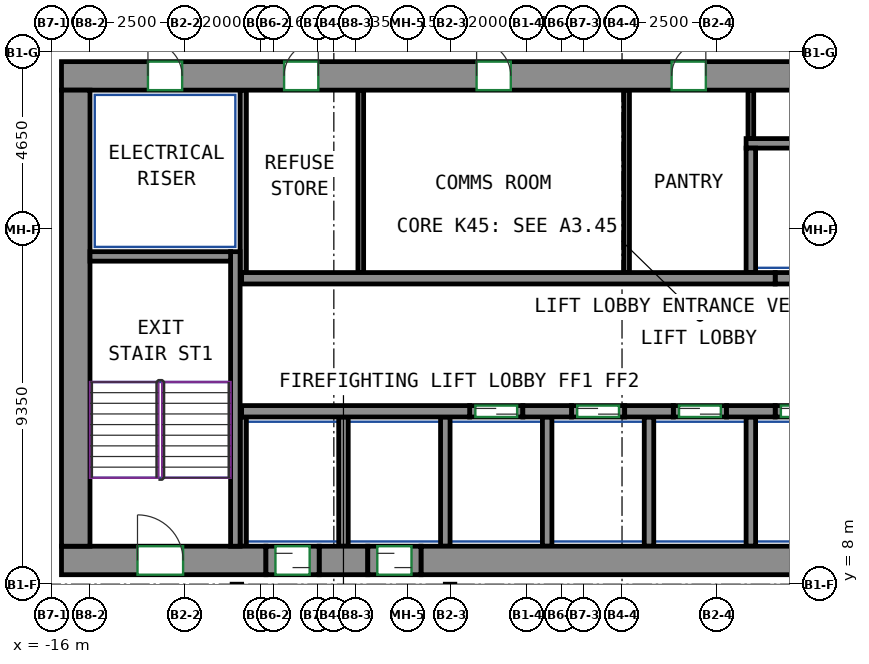
"""IFC4 building model, lengths in metres.
Left out: names, types, materials, properties, quantities, classifications, styles, units other than length and angle.
Written with IfcOpenShell. Run it as: python <this file> out.ifc"""

import sys

from ifc_helpers import new_model, si_unit, direction, frame, frame_2d, origin, place, context, subcontext, project, spatial, rectangle, extrude, source, transform, mapped, element, fill, save


model = new_model("IFC4")
c1 = context("Model", 3, precision=1e-05, world=origin(), true_north=direction((0.0, 1.0)))
c2 = subcontext(c1, "Body", "Model", "MODEL_VIEW")
j1 = project(units=[si_unit("LENGTHUNIT", "METRE"), si_unit("PLANEANGLEUNIT", "RADIAN")], contexts=[c1])
p1 = place(None, origin())
s1 = spatial("IfcSite", under=j1, at=p1, CompositionType="ELEMENT")
p2 = place(p1, origin())
s2 = spatial("IfcBuilding", under=s1, at=p2, CompositionType="ELEMENT")
p3 = place(p2, frame((0.0, 0.0, 185.5)))
s3 = spatial("IfcBuildingStorey", under=s2, at=p3, CompositionType="ELEMENT", Elevation=185.5)
m1 = source(origin(), c2, "Body", "SweptSolid", [
    extrude(rectangle(XDim=5.38, YDim=0.75, at=frame_2d((2.69, 0.0))), origin(), (0.0, 0.0, 1.0), 3.12),
])
p4 = place(p3, frame((-15.75, 8.625, 0.0), z_axis=(0.0, 0.0, 1.0), x_axis=(1.0, 0.0, 0.0)))
e1 = element("IfcWall", 1, at=p4, inside=s3, PredefinedType="SHEAR", context=c2, shape_type="MappedRepresentation", body=[
    mapped(m1, transform((0.0, 0.0, 0.0))),
])
p5 = place(p4, frame((2.0, 0.0, 0.0)))
e2 = element("IfcOpeningElement", 2, at=p5, cuts=e1, PredefinedType="OPENING", context=c2, shape_type="SweptSolid", body=[
    extrude(rectangle(XDim=1.2, YDim=2.1, at=frame_2d((0.6, 1.05))), frame((0.0, 0.385, 0.0), z_axis=(0.0, -1.0, 0.0), x_axis=(1.0, 0.0, 0.0)), (0.0, 0.0, 1.0), 0.77),
])
m2 = source(origin(), c2, "Body", "SweptSolid", [
    extrude(rectangle(XDim=1.28, YDim=0.75, at=frame_2d((0.64, 0.0))), origin(), (0.0, 0.0, 1.0), 3.12),
])
p6 = place(p3, frame((-8.97, 8.625, 0.0), z_axis=(0.0, 0.0, 1.0), x_axis=(1.0, 0.0, 0.0)))
e3 = element("IfcWall", 3, at=p6, inside=s3, PredefinedType="SHEAR", context=c2, shape_type="MappedRepresentation", body=[
    mapped(m2, transform((0.0, 0.0, 0.0))),
])
m3 = source(origin(), c2, "Body", "SweptSolid", [
    extrude(rectangle(XDim=14.18, YDim=0.75, at=frame_2d((7.09, 0.0))), origin(), (0.0, 0.0, 1.0), 3.12),
])
p7 = place(p3, frame((-6.29, 8.625, 0.0), z_axis=(0.0, 0.0, 1.0), x_axis=(1.0, 0.0, 0.0)))
e4 = element("IfcWall", 4, at=p7, inside=s3, PredefinedType="SHEAR", context=c2, shape_type="MappedRepresentation", body=[
    mapped(m3, transform((0.0, 0.0, 0.0))),
])
m4 = source(origin(), c2, "Body", "SweptSolid", [
    extrude(rectangle(XDim=33.6, YDim=0.75, at=frame_2d((16.8, 0.0))), origin(), (0.0, 0.0, 1.0), 3.12),
])
p8 = place(p3, frame((-15.75, 21.375, 0.0), z_axis=(0.0, 0.0, 1.0), x_axis=(1.0, 0.0, 0.0)))
e5 = element("IfcWall", 5, at=p8, inside=s3, PredefinedType="SHEAR", context=c2, shape_type="MappedRepresentation", body=[
    mapped(m4, transform((0.0, 0.0, 0.0))),
])
p9 = place(p8, frame((5.858, 0.0, 0.0)))
e6 = element("IfcOpeningElement", 6, at=p9, cuts=e5, PredefinedType="OPENING", context=c2, shape_type="SweptSolid", body=[
    extrude(rectangle(XDim=0.9, YDim=2.1, at=frame_2d((0.45, 1.05))), frame((0.0, 0.385, 0.0), z_axis=(0.0, -1.0, 0.0), x_axis=(1.0, 0.0, 0.0)), (0.0, 0.0, 1.0), 0.77),
])
p10 = place(p8, frame((10.923, 0.0, 0.0)))
e7 = element("IfcOpeningElement", 7, at=p10, cuts=e5, PredefinedType="OPENING", context=c2, shape_type="SweptSolid", body=[
    extrude(rectangle(XDim=0.9, YDim=2.1, at=frame_2d((0.45, 1.05))), frame((0.0, 0.385, 0.0), z_axis=(0.0, -1.0, 0.0), x_axis=(1.0, 0.0, 0.0)), (0.0, 0.0, 1.0), 0.77),
])
p11 = place(p8, frame((16.055, 0.0, 0.0)))
e8 = element("IfcOpeningElement", 8, at=p11, cuts=e5, PredefinedType="OPENING", context=c2, shape_type="SweptSolid", body=[
    extrude(rectangle(XDim=0.9, YDim=2.1, at=frame_2d((0.45, 1.05))), frame((0.0, 0.385, 0.0), z_axis=(0.0, -1.0, 0.0), x_axis=(1.0, 0.0, 0.0)), (0.0, 0.0, 1.0), 0.77),
])
p12 = place(p8, frame((20.879, 0.0, 0.0)))
e9 = element("IfcOpeningElement", 9, at=p12, cuts=e5, PredefinedType="OPENING", context=c2, shape_type="SweptSolid", body=[
    extrude(rectangle(XDim=0.9, YDim=2.1, at=frame_2d((0.45, 1.05))), frame((0.0, 0.385, 0.0), z_axis=(0.0, -1.0, 0.0), x_axis=(1.0, 0.0, 0.0)), (0.0, 0.0, 1.0), 0.77),
])
p13 = place(p8, frame((26.239, 0.0, 0.0)))
e10 = element("IfcOpeningElement", 10, at=p13, cuts=e5, PredefinedType="OPENING", context=c2, shape_type="SweptSolid", body=[
    extrude(rectangle(XDim=0.9, YDim=2.1, at=frame_2d((0.45, 1.05))), frame((0.0, 0.385, 0.0), z_axis=(0.0, -1.0, 0.0), x_axis=(1.0, 0.0, 0.0)), (0.0, 0.0, 1.0), 0.77),
])
p14 = place(p8, frame((2.275, 0.0, 0.0)))
e11 = element("IfcOpeningElement", 11, at=p14, cuts=e5, PredefinedType="OPENING", context=c2, shape_type="SweptSolid", body=[
    extrude(rectangle(XDim=0.9, YDim=2.1, at=frame_2d((0.45, 1.05))), frame((0.0, 0.385, 0.0), z_axis=(0.0, -1.0, 0.0), x_axis=(1.0, 0.0, 0.0)), (0.0, 0.0, 1.0), 0.77),
])
p15 = place(p8, frame((30.425, 0.0, 0.0)))
e12 = element("IfcOpeningElement", 12, at=p15, cuts=e5, PredefinedType="OPENING", context=c2, shape_type="SweptSolid", body=[
    extrude(rectangle(XDim=0.9, YDim=2.1, at=frame_2d((0.45, 1.05))), frame((0.0, 0.385, 0.0), z_axis=(0.0, -1.0, 0.0), x_axis=(1.0, 0.0, 0.0)), (0.0, 0.0, 1.0), 0.77),
])
m5 = source(origin(), c2, "Body", "SweptSolid", [
    extrude(rectangle(XDim=12.0, YDim=0.75, at=frame_2d((6.0, 0.0))), origin(), (0.0, 0.0, 1.0), 3.12),
])
p16 = place(p3, frame((-15.375, 9.0, 0.0), z_axis=(0.0, 0.0, 1.0), x_axis=(0.0, 1.0, 0.0)))
e13 = element("IfcWall", 13, at=p16, inside=s3, PredefinedType="SHEAR", context=c2, shape_type="MappedRepresentation", body=[
    mapped(m5, transform((0.0, 0.0, 0.0))),
])
m6 = source(origin(), c2, "Body", "SweptSolid", [
    extrude(rectangle(XDim=7.75, YDim=0.25, at=frame_2d((3.875, 0.0))), origin(), (0.0, 0.0, 1.0), 3.12),
])
p17 = place(p3, frame((-11.175, 9.0, 0.0), z_axis=(0.0, 0.0, 1.0), x_axis=(0.0, 1.0, 0.0)))
e14 = element("IfcWall", 14, at=p17, inside=s3, PredefinedType="SHEAR", context=c2, shape_type="MappedRepresentation", body=[
    mapped(m6, transform((0.0, 0.0, 0.0))),
])
m7 = source(origin(), c2, "Body", "SweptSolid", [
    extrude(rectangle(XDim=3.7, YDim=0.25, at=frame_2d((1.85, 0.0))), origin(), (0.0, 0.0, 1.0), 3.12),
])
p18 = place(p3, frame((-15.0, 16.625, 0.0), z_axis=(0.0, 0.0, 1.0), x_axis=(1.0, 0.0, 0.0)))
e15 = element("IfcWall", 15, at=p18, inside=s3, PredefinedType="SHEAR", context=c2, shape_type="MappedRepresentation", body=[
    mapped(m7, transform((0.0, 0.0, 0.0))),
])
m8 = source(origin(), c2, "Body", "SweptSolid", [
    extrude(rectangle(XDim=6.0, YDim=0.3, at=frame_2d((3.0, 0.0))), origin(), (0.0, 0.0, 1.0), 3.12),
])
p19 = place(p3, frame((-11.01, 12.55, 0.0), z_axis=(0.0, 0.0, 1.0), x_axis=(1.0, 0.0, 0.0)))
e16 = element("IfcWall", 16, at=p19, inside=s3, PredefinedType="SHEAR", context=c2, shape_type="MappedRepresentation", body=[
    mapped(m8, transform((0.0, 0.0, 0.0))),
])
m9 = source(origin(), c2, "Body", "SweptSolid", [
    extrude(rectangle(XDim=1.28, YDim=0.3, at=frame_2d((0.64, 0.0))), origin(), (0.0, 0.0, 1.0), 3.12),
])
for number, where, z_axis, x_axis in (
    (17, (-3.61, 12.55, 0.0), (0.0, 0.0, 1.0), (1.0, 0.0, 0.0)),
    (18, (-0.93, 12.55, 0.0), (0.0, 0.0, 1.0), (1.0, 0.0, 0.0)),
    (19, (1.75, 12.55, 0.0), (0.0, 0.0, 1.0), (1.0, 0.0, 0.0)),
):
    element("IfcWall", number, at=place(p3, frame(where, z_axis=z_axis, x_axis=x_axis)), inside=s3, PredefinedType="SHEAR", context=c2, shape_type="MappedRepresentation", body=[
        mapped(m9, transform((0.0, 0.0, 0.0))),
    ])
m10 = source(origin(), c2, "Body", "SweptSolid", [
    extrude(rectangle(XDim=14.04, YDim=0.3, at=frame_2d((7.02, 0.0))), origin(), (0.0, 0.0, 1.0), 3.12),
])
p20 = place(p3, frame((-11.01, 16.05, 0.0), z_axis=(0.0, 0.0, 1.0), x_axis=(1.0, 0.0, 0.0)))
e20 = element("IfcWall", 20, at=p20, inside=s3, PredefinedType="SHEAR", context=c2, shape_type="MappedRepresentation", body=[
    mapped(m10, transform((0.0, 0.0, 0.0))),
])
m11 = source(origin(), c2, "Body", "SweptSolid", [
    extrude(rectangle(XDim=1.4, YDim=0.3, at=frame_2d((0.7, 0.0))), origin(), (0.0, 0.0, 1.0), 3.12),
])
p21 = place(p3, frame((-5.01, 12.55, 0.0), z_axis=(0.0, 0.0, 1.0), x_axis=(1.0, 0.0, 0.0)))
e21 = element("IfcWall", 21, at=p21, inside=s3, PredefinedType="PARTITIONING", context=c2, shape_type="MappedRepresentation", body=[
    mapped(m11, transform((0.0, 0.0, 0.0))),
])
p22 = place(p21, frame((0.15, 0.0, 0.0)))
e22 = element("IfcOpeningElement", 22, at=p22, cuts=e21, PredefinedType="OPENING", context=c2, shape_type="SweptSolid", body=[
    extrude(rectangle(XDim=1.1, YDim=2.1, at=frame_2d((0.55, 1.05))), frame((0.0, 0.16, 0.0), z_axis=(0.0, -1.0, 0.0), x_axis=(1.0, 0.0, 0.0)), (0.0, 0.0, 1.0), 0.32),
])
m12 = source(origin(), c2, "Body", "SweptSolid", [
    extrude(rectangle(XDim=1.4, YDim=0.3, at=frame_2d((0.7, 0.0))), origin(), (0.0, 0.0, 1.0), 3.12),
])
p23 = place(p3, frame((-2.33, 12.55, 0.0), z_axis=(0.0, 0.0, 1.0), x_axis=(1.0, 0.0, 0.0)))
e23 = element("IfcWall", 23, at=p23, inside=s3, PredefinedType="PARTITIONING", context=c2, shape_type="MappedRepresentation", body=[
    mapped(m12, transform((0.0, 0.0, 0.0))),
])
p24 = place(p23, frame((0.15, 0.0, 0.0)))
e24 = element("IfcOpeningElement", 24, at=p24, cuts=e23, PredefinedType="OPENING", context=c2, shape_type="SweptSolid", body=[
    extrude(rectangle(XDim=1.1, YDim=2.1, at=frame_2d((0.55, 1.05))), frame((0.0, 0.16, 0.0), z_axis=(0.0, -1.0, 0.0), x_axis=(1.0, 0.0, 0.0)), (0.0, 0.0, 1.0), 0.32),
])
p25 = place(p3, frame((0.35, 12.55, 0.0), z_axis=(0.0, 0.0, 1.0), x_axis=(1.0, 0.0, 0.0)))
e25 = element("IfcWall", 25, at=p25, inside=s3, PredefinedType="PARTITIONING", context=c2, shape_type="MappedRepresentation", body=[
    mapped(m11, transform((0.0, 0.0, 0.0))),
])
p26 = place(p25, frame((0.15, 0.0, 0.0)))
e26 = element("IfcOpeningElement", 26, at=p26, cuts=e25, PredefinedType="OPENING", context=c2, shape_type="SweptSolid", body=[
    extrude(rectangle(XDim=1.1, YDim=2.1, at=frame_2d((0.55, 1.05))), frame((0.0, 0.16, 0.0), z_axis=(0.0, -1.0, 0.0), x_axis=(1.0, 0.0, 0.0)), (0.0, 0.0, 1.0), 0.32),
])
p27 = place(p3, frame((3.03, 12.55, 0.0), z_axis=(0.0, 0.0, 1.0), x_axis=(1.0, 0.0, 0.0)))
e27 = element("IfcWall", 27, at=p27, inside=s3, PredefinedType="PARTITIONING", context=c2, shape_type="MappedRepresentation", body=[
    mapped(m11, transform((0.0, 0.0, 0.0))),
])
p28 = place(p27, frame((0.15, 0.0, 0.0)))
e28 = element("IfcOpeningElement", 28, at=p28, cuts=e27, PredefinedType="OPENING", context=c2, shape_type="SweptSolid", body=[
    extrude(rectangle(XDim=1.1, YDim=2.1, at=frame_2d((0.55, 1.05))), frame((0.0, 0.16, 0.0), z_axis=(0.0, -1.0, 0.0), x_axis=(1.0, 0.0, 0.0)), (0.0, 0.0, 1.0), 0.32),
])
p29 = place(p3, frame((3.03, 16.05, 0.0), z_axis=(0.0, 0.0, 1.0), x_axis=(1.0, 0.0, 0.0)))
e29 = element("IfcWall", 29, at=p29, inside=s3, PredefinedType="PARTITIONING", context=c2, shape_type="MappedRepresentation", body=[
    mapped(m11, transform((0.0, 0.0, 0.0))),
])
m13 = source(origin(), c2, "Body", "SweptSolid", [
    extrude(rectangle(XDim=10.97, YDim=0.25, at=frame_2d((5.485, 0.0))), origin(), (0.0, 0.0, 1.0), 3.12),
])
p30 = place(p3, frame((2.265, 19.6, 0.0), z_axis=(0.0, 0.0, 1.0), x_axis=(1.0, 0.0, 0.0)))
e30 = element("IfcWall", 30, at=p30, inside=s3, PredefinedType="PARTITIONING", context=c2, shape_type="MappedRepresentation", body=[
    mapped(m13, transform((0.0, 0.0, 0.0))),
])
m14 = source(origin(), c2, "Body", "SweptSolid", [
    extrude(rectangle(XDim=4.8, YDim=0.165, at=frame_2d((2.4, 0.0))), origin(), (0.0, 0.0, 1.0), 3.12),
])
p31 = place(p3, frame((-10.968, 16.2, 0.0), z_axis=(0.0, 0.0, 1.0), x_axis=(0.0, 1.0, 0.0)))
e31 = element("IfcWall", 31, at=p31, inside=s3, PredefinedType="PARTITIONING", context=c2, shape_type="MappedRepresentation", body=[
    mapped(m14, transform((0.0, 0.0, 0.0))),
])
m15 = source(origin(), c2, "Body", "SweptSolid", [
    extrude(rectangle(XDim=3.275, YDim=0.25, at=frame_2d((1.638, 0.0))), origin(), (0.0, 0.0, 1.0), 3.12),
])
p32 = place(p3, frame((2.39, 16.2, 0.0), z_axis=(0.0, 0.0, 1.0), x_axis=(0.0, 1.0, 0.0)))
e32 = element("IfcWall", 32, at=p32, inside=s3, PredefinedType="PARTITIONING", context=c2, shape_type="MappedRepresentation", body=[
    mapped(m15, transform((0.0, 0.0, 0.0))),
])
m16 = source(origin(), c2, "Body", "SweptSolid", [
    extrude(rectangle(XDim=3.4, YDim=0.25, at=frame_2d((1.7, 0.0))), origin(), (0.0, 0.0, 1.0), 3.12),
])
for number, where, z_axis, x_axis in (
    (33, (2.39, 9.0, 0.0), (0.0, 0.0, 1.0), (0.0, 1.0, 0.0)),
    (34, (-0.29, 9.0, 0.0), (0.0, 0.0, 1.0), (0.0, 1.0, 0.0)),
):
    element("IfcWall", number, at=place(p3, frame(where, z_axis=z_axis, x_axis=x_axis)), inside=s3, PredefinedType="PARTITIONING", context=c2, shape_type="MappedRepresentation", body=[
        mapped(m16, transform((0.0, 0.0, 0.0))),
    ])
m17 = source(origin(), c2, "Body", "SweptSolid", [
    extrude(rectangle(XDim=3.4, YDim=0.165, at=frame_2d((1.7, 0.0))), origin(), (0.0, 0.0, 1.0), 3.12),
])
p33 = place(p3, frame((-10.968, 9.0, 0.0), z_axis=(0.0, 0.0, 1.0), x_axis=(0.0, 1.0, 0.0)))
e35 = element("IfcWall", 35, at=p33, inside=s3, PredefinedType="PARTITIONING", context=c2, shape_type="MappedRepresentation", body=[
    mapped(m17, transform((0.0, 0.0, 0.0))),
])
for number, where, z_axis, x_axis in (
    (36, (-2.97, 9.0, 0.0), (0.0, 0.0, 1.0), (0.0, 1.0, 0.0)),
    (37, (-5.65, 9.0, 0.0), (0.0, 0.0, 1.0), (0.0, 1.0, 0.0)),
    (38, (-8.33, 9.0, 0.0), (0.0, 0.0, 1.0), (0.0, 1.0, 0.0)),
):
    element("IfcWall", number, at=place(p3, frame(where, z_axis=z_axis, x_axis=x_axis)), inside=s3, PredefinedType="PARTITIONING", context=c2, shape_type="MappedRepresentation", body=[
        mapped(m16, transform((0.0, 0.0, 0.0))),
    ])
m18 = source(origin(), c2, "Body", "SweptSolid", [
    extrude(rectangle(XDim=4.8, YDim=0.15, at=frame_2d((2.4, 0.0))), origin(), (0.0, 0.0, 1.0), 3.12),
])
for number, where, z_axis, x_axis in (
    (39, (-7.875, 16.2, 0.0), (0.0, 0.0, 1.0), (0.0, 1.0, 0.0)),
    (40, (-0.88, 16.2, 0.0), (0.0, 0.0, 1.0), (0.0, 1.0, 0.0)),
):
    element("IfcWall", number, at=place(p3, frame(where, z_axis=z_axis, x_axis=x_axis)), inside=s3, PredefinedType="PARTITIONING", context=c2, shape_type="MappedRepresentation", body=[
        mapped(m18, transform((0.0, 0.0, 0.0))),
    ])
m19 = source(origin(), c2, "Body", "SweptSolid", [
    extrude(rectangle(XDim=1.275, YDim=0.15, at=frame_2d((0.637, 0.0))), origin(), (0.0, 0.0, 1.0), 3.12),
])
p34 = place(p3, frame((2.39, 19.725, 0.0), z_axis=(0.0, 0.0, 1.0), x_axis=(0.0, 1.0, 0.0)))
e41 = element("IfcWall", 41, at=p34, inside=s3, PredefinedType="PARTITIONING", context=c2, shape_type="MappedRepresentation", body=[
    mapped(m19, transform((0.0, 0.0, 0.0))),
])
m20 = source(origin(), c2, "Body", "SweptSolid", [
    extrude(rectangle(XDim=1.4, YDim=0.75, at=frame_2d((0.7, 0.0))), origin(), (0.0, 0.0, 1.0), 2.7),
])
p35 = place(p3, frame((-10.37, 8.625, 0.0), z_axis=(0.0, 0.0, 1.0), x_axis=(1.0, 0.0, 0.0)))
e42 = element("IfcWall", 42, at=p35, inside=s3, PredefinedType="PARTITIONING", context=c2, shape_type="MappedRepresentation", body=[
    mapped(m20, transform((0.0, 0.0, 0.0))),
])
p36 = place(p35, frame((0.25, 0.0, 0.0)))
e43 = element("IfcOpeningElement", 43, at=p36, cuts=e42, PredefinedType="OPENING", context=c2, shape_type="SweptSolid", body=[
    extrude(rectangle(XDim=0.9, YDim=2.1, at=frame_2d((0.45, 1.05))), frame((0.0, 0.385, 0.0), z_axis=(0.0, -1.0, 0.0), x_axis=(1.0, 0.0, 0.0)), (0.0, 0.0, 1.0), 0.77),
])
m21 = source(origin(), c2, "Body", "SweptSolid", [
    extrude(rectangle(XDim=1.4, YDim=0.75, at=frame_2d((0.7, 0.0))), origin(), (0.0, 0.0, 1.0), 2.7),
])
p37 = place(p3, frame((-7.69, 8.625, 0.0), z_axis=(0.0, 0.0, 1.0), x_axis=(1.0, 0.0, 0.0)))
e44 = element("IfcWall", 44, at=p37, inside=s3, PredefinedType="PARTITIONING", context=c2, shape_type="MappedRepresentation", body=[
    mapped(m21, transform((0.0, 0.0, 0.0))),
])
p38 = place(p37, frame((0.25, 0.0, 0.0)))
e45 = element("IfcOpeningElement", 45, at=p38, cuts=e44, PredefinedType="OPENING", context=c2, shape_type="SweptSolid", body=[
    extrude(rectangle(XDim=0.9, YDim=2.1, at=frame_2d((0.45, 1.05))), frame((0.0, 0.385, 0.0), z_axis=(0.0, -1.0, 0.0), x_axis=(1.0, 0.0, 0.0)), (0.0, 0.0, 1.0), 0.77),
])
p39 = place(p36, origin())
e46 = element("IfcDoor", 46, at=p39, inside=s3, OperationType="SLIDING_TO_LEFT", PredefinedType="DOOR", context=c2, shape_type="SweptSolid", body=[
    extrude(rectangle(XDim=0.9, YDim=2.1, at=frame_2d((0.45, 1.05))), frame((0.0, 0.28, 0.0), z_axis=(0.0, -1.0, 0.0), x_axis=(1.0, 0.0, 0.0)), (0.0, 0.0, 1.0), 0.05),
])
fill(e43, e46)
p40 = place(p38, origin())
e47 = element("IfcDoor", 47, at=p40, inside=s3, OperationType="SLIDING_TO_RIGHT", PredefinedType="DOOR", context=c2, shape_type="SweptSolid", body=[
    extrude(rectangle(XDim=0.9, YDim=2.1, at=frame_2d((0.45, 1.05))), frame((0.0, 0.28, 0.0), z_axis=(0.0, -1.0, 0.0), x_axis=(1.0, 0.0, 0.0)), (0.0, 0.0, 1.0), 0.05),
])
fill(e45, e47)
p41 = place(p22, origin())
e48 = element("IfcDoor", 48, at=p41, inside=s3, OperationType="DOUBLE_DOOR_SLIDING", PredefinedType="DOOR", context=c2, shape_type="SweptSolid", body=[
    extrude(rectangle(XDim=1.1, YDim=2.1, at=frame_2d((0.55, 1.05))), frame((0.0, 0.025, 0.0), z_axis=(0.0, -1.0, 0.0), x_axis=(1.0, 0.0, 0.0)), (0.0, 0.0, 1.0), 0.05),
])
fill(e22, e48)
p42 = place(p24, origin())
e49 = element("IfcDoor", 49, at=p42, inside=s3, OperationType="DOUBLE_DOOR_SLIDING", PredefinedType="DOOR", context=c2, shape_type="SweptSolid", body=[
    extrude(rectangle(XDim=1.1, YDim=2.1, at=frame_2d((0.55, 1.05))), frame((0.0, 0.025, 0.0), z_axis=(0.0, -1.0, 0.0), x_axis=(1.0, 0.0, 0.0)), (0.0, 0.0, 1.0), 0.05),
])
fill(e24, e49)
p43 = place(p26, origin())
e50 = element("IfcDoor", 50, at=p43, inside=s3, OperationType="DOUBLE_DOOR_SLIDING", PredefinedType="DOOR", context=c2, shape_type="SweptSolid", body=[
    extrude(rectangle(XDim=1.1, YDim=2.1, at=frame_2d((0.55, 1.05))), frame((0.0, 0.025, 0.0), z_axis=(0.0, -1.0, 0.0), x_axis=(1.0, 0.0, 0.0)), (0.0, 0.0, 1.0), 0.05),
])
fill(e26, e50)
p44 = place(p28, origin())
e51 = element("IfcDoor", 51, at=p44, inside=s3, OperationType="DOUBLE_DOOR_SLIDING", PredefinedType="DOOR", context=c2, shape_type="SweptSolid", body=[
    extrude(rectangle(XDim=1.1, YDim=2.1, at=frame_2d((0.55, 1.05))), frame((0.0, 0.025, 0.0), z_axis=(0.0, -1.0, 0.0), x_axis=(1.0, 0.0, 0.0)), (0.0, 0.0, 1.0), 0.05),
])
fill(e28, e51)
p45 = place(p9, origin())
e52 = element("IfcDoor", 52, at=p45, inside=s3, OperationType="SINGLE_SWING_RIGHT", PredefinedType="DOOR", context=c2, shape_type="SweptSolid", body=[
    extrude(rectangle(XDim=0.9, YDim=2.1, at=frame_2d((0.45, 1.05))), frame((0.0, -0.23, 0.0), z_axis=(0.0, -1.0, 0.0), x_axis=(1.0, 0.0, 0.0)), (0.0, 0.0, 1.0), 0.05),
])
fill(e6, e52)
p46 = place(p10, origin())
e53 = element("IfcDoor", 53, at=p46, inside=s3, OperationType="SINGLE_SWING_LEFT", PredefinedType="DOOR", context=c2, shape_type="SweptSolid", body=[
    extrude(rectangle(XDim=0.9, YDim=2.1, at=frame_2d((0.45, 1.05))), frame((0.0, -0.23, 0.0), z_axis=(0.0, -1.0, 0.0), x_axis=(1.0, 0.0, 0.0)), (0.0, 0.0, 1.0), 0.05),
])
fill(e7, e53)
p47 = place(p11, origin())
e54 = element("IfcDoor", 54, at=p47, inside=s3, OperationType="SINGLE_SWING_RIGHT", PredefinedType="DOOR", context=c2, shape_type="SweptSolid", body=[
    extrude(rectangle(XDim=0.9, YDim=2.1, at=frame_2d((0.45, 1.05))), frame((0.0, -0.23, 0.0), z_axis=(0.0, -1.0, 0.0), x_axis=(1.0, 0.0, 0.0)), (0.0, 0.0, 1.0), 0.05),
])
fill(e8, e54)
p48 = place(p14, origin())
e55 = element("IfcDoor", 55, at=p48, inside=s3, OperationType="SINGLE_SWING_LEFT", PredefinedType="DOOR", context=c2, shape_type="SweptSolid", body=[
    extrude(rectangle(XDim=0.9, YDim=2.1, at=frame_2d((0.45, 1.05))), frame((0.0, -0.23, 0.0), z_axis=(0.0, -1.0, 0.0), x_axis=(1.0, 0.0, 0.0)), (0.0, 0.0, 1.0), 0.05),
])
fill(e11, e55)
p49 = place(p5, origin())
e56 = element("IfcDoor", 56, at=p49, inside=s3, OperationType="DOUBLE_DOOR_SINGLE_SWING", PredefinedType="DOOR", context=c2, shape_type="SweptSolid", body=[
    extrude(rectangle(XDim=1.2, YDim=2.1, at=frame_2d((0.6, 1.05))), frame((0.0, 0.28, 0.0), z_axis=(0.0, -1.0, 0.0), x_axis=(1.0, 0.0, 0.0)), (0.0, 0.0, 1.0), 0.05),
])
fill(e2, e56)
save(model, sys.argv[1])
